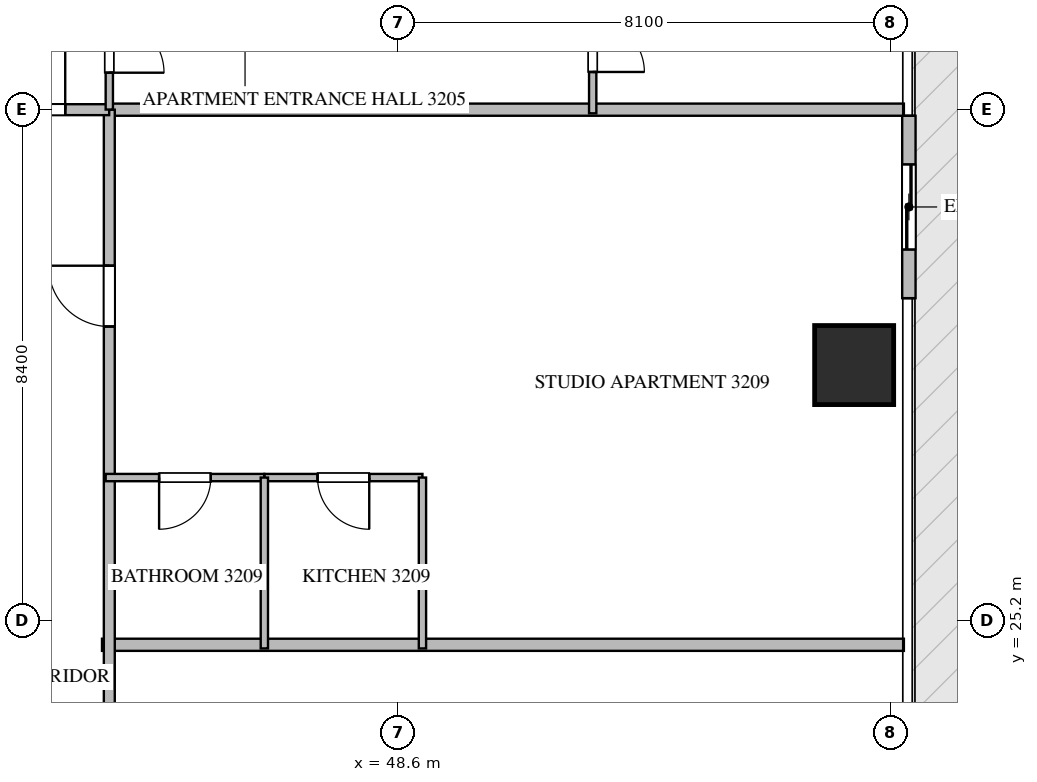
"""IFC4 building model, lengths in metres.
Left out: names, types, materials, properties, quantities, classifications, styles, units other than length and angle.
Written with IfcOpenShell. Run it as: python <this file> out.ifc"""

import sys

from ifc_helpers import new_model, si_unit, direction, frame, frame_2d, origin, origin_2d, place, context, subcontext, project, spatial, rectangle, extrude, source, transform, mapped, element, fill, save


model = new_model("IFC4")
c1 = context("Model", 3, precision=1e-05, world=origin(), true_north=direction((0.0, 1.0)))
c2 = subcontext(c1, "Body", "Model", "MODEL_VIEW")
j1 = project(units=[si_unit("LENGTHUNIT", "METRE"), si_unit("PLANEANGLEUNIT", "RADIAN")], contexts=[c1])
p1 = place(None, origin())
s1 = spatial("IfcSite", under=j1, at=p1, CompositionType="ELEMENT")
p2 = place(p1, origin())
s2 = spatial("IfcBuilding", under=s1, at=p2, CompositionType="ELEMENT")
p3 = place(p2, frame((0.0, 0.0, 131.4)))
s3 = spatial("IfcBuildingStorey", under=s2, at=p3, CompositionType="ELEMENT", Elevation=131.4)
m1 = source(origin(), c2, "Body", "SweptSolid", [
    extrude(rectangle(XDim=1.3, YDim=1.3, at=origin_2d()), origin(), (0.0, 0.0, 1.0), 3.75),
])
p4 = place(p3, frame((56.1, 29.4, -0.26), z_axis=(0.0, 0.0, 1.0), x_axis=(1.0, 0.0, 0.0)))
e1 = element("IfcColumn", 1, at=p4, inside=s3, PredefinedType="COLUMN", context=c2, shape_type="MappedRepresentation", body=[
    mapped(m1, transform((0.0, 0.0, 0.0), scale=1.0)),
])
p5 = place(p3, frame((57.0, 30.5, 0.0), z_axis=(0.0, 0.0, 1.0), x_axis=(0.0, 1.0, 0.0)))
e2 = element("IfcWall", 2, at=p5, inside=s3, PredefinedType="ELEMENTEDWALL", context=c2, shape_type="SweptSolid", body=[
    extrude(rectangle(XDim=3.0, YDim=0.22, at=frame_2d((1.5, 0.0))), origin(), (0.0, 0.0, 1.0), 3.475),
])
p6 = place(p5, frame((0.8, 0.0, 0.0)))
e3 = element("IfcOpeningElement", 3, at=p6, cuts=e2, PredefinedType="OPENING", context=c2, shape_type="SweptSolid", body=[
    extrude(rectangle(XDim=1.4, YDim=2.25, at=frame_2d((0.7, 1.125))), frame((0.0, 0.12, 0.0), z_axis=(0.0, -1.0, 0.0), x_axis=(1.0, 0.0, 0.0)), (0.0, 0.0, 1.0), 0.24),
])
p7 = place(p3, frame((43.73, 24.8, 0.0), z_axis=(0.0, 0.0, 1.0), x_axis=(1.0, 0.0, 0.0)))
e4 = element("IfcWall", 4, at=p7, inside=s3, PredefinedType="PARTITIONING", context=c2, shape_type="SweptSolid", body=[
    extrude(rectangle(XDim=13.188, YDim=0.2, at=frame_2d((6.594, 0.0))), origin(), (0.0, 0.0, 1.0), 3.49),
])
p8 = place(p3, frame((43.85, 33.6, 0.0), z_axis=(0.0, 0.0, 1.0), x_axis=(1.0, 0.0, 0.0)))
e5 = element("IfcWall", 5, at=p8, inside=s3, PredefinedType="PARTITIONING", context=c2, shape_type="SweptSolid", body=[
    extrude(rectangle(XDim=13.068, YDim=0.2, at=frame_2d((6.534, 0.0))), origin(), (0.0, 0.0, 1.0), 3.49),
])
p9 = place(p3, frame((43.85, 14.9, 0.0), z_axis=(0.0, 0.0, 1.0), x_axis=(0.0, 1.0, 0.0)))
e6 = element("IfcWall", 6, at=p9, inside=s3, PredefinedType="PARTITIONING", context=c2, shape_type="SweptSolid", body=[
    extrude(rectangle(XDim=18.7, YDim=0.18, at=frame_2d((9.35, 0.0))), origin(), (0.0, 0.0, 1.0), 3.49),
])
p10 = place(p9, frame((6.708, 0.0, 0.0)))
e7 = element("IfcOpeningElement", 7, at=p10, cuts=e6, PredefinedType="OPENING", context=c2, shape_type="SweptSolid", body=[
    extrude(rectangle(XDim=1.0, YDim=2.15, at=frame_2d((0.5, 1.075))), frame((0.0, 0.1, 0.0), z_axis=(0.0, -1.0, 0.0), x_axis=(1.0, 0.0, 0.0)), (0.0, 0.0, 1.0), 0.2),
])
p11 = place(p9, frame((15.134, 0.0, 0.0)))
e8 = element("IfcOpeningElement", 8, at=p11, cuts=e6, PredefinedType="OPENING", context=c2, shape_type="SweptSolid", body=[
    extrude(rectangle(XDim=1.0, YDim=2.15, at=frame_2d((0.5, 1.075))), frame((0.0, 0.1, 0.0), z_axis=(0.0, -1.0, 0.0), x_axis=(1.0, 0.0, 0.0)), (0.0, 0.0, 1.0), 0.2),
])
p12 = place(p3, frame((41.402, 33.6, 0.0), z_axis=(0.0, 0.0, 1.0), x_axis=(1.0, 0.0, 0.0)))
e9 = element("IfcWall", 9, at=p12, inside=s3, PredefinedType="PARTITIONING", context=c2, shape_type="SweptSolid", body=[
    extrude(rectangle(XDim=2.446, YDim=0.18, at=frame_2d((1.223, 0.0))), origin(), (0.0, 0.0, 1.0), 3.49),
])
p13 = place(p12, frame((0.723, 0.0, 0.0)))
e10 = element("IfcOpeningElement", 10, at=p13, cuts=e9, PredefinedType="OPENING", context=c2, shape_type="SweptSolid", body=[
    extrude(rectangle(XDim=1.0, YDim=2.15, at=frame_2d((0.5, 1.075))), frame((0.0, 0.1, 0.0), z_axis=(0.0, -1.0, 0.0), x_axis=(1.0, 0.0, 0.0)), (0.0, 0.0, 1.0), 0.2),
])
p14 = place(p3, frame((43.85, 35.75, 0.0), z_axis=(0.0, 0.0, 1.0), x_axis=(0.0, -1.0, 0.0)))
e11 = element("IfcWall", 11, at=p14, inside=s3, PredefinedType="PARTITIONING", context=c2, shape_type="SweptSolid", body=[
    extrude(rectangle(XDim=2.148, YDim=0.12, at=frame_2d((1.074, 0.0))), origin(), (0.0, 0.0, 1.0), 3.49),
])
p15 = place(p14, frame((0.642, 0.0, 0.0)))
e12 = element("IfcOpeningElement", 12, at=p15, cuts=e11, PredefinedType="OPENING", context=c2, shape_type="SweptSolid", body=[
    extrude(rectangle(XDim=0.9, YDim=2.1, at=frame_2d((0.45, 1.05))), frame((0.0, 0.07, 0.0), z_axis=(0.0, -1.0, 0.0), x_axis=(1.0, 0.0, 0.0)), (0.0, 0.0, 1.0), 0.14),
])
p16 = place(p3, frame((51.8, 35.75, 0.0), z_axis=(0.0, 0.0, 1.0), x_axis=(0.0, -1.0, 0.0)))
e13 = element("IfcWall", 13, at=p16, inside=s3, PredefinedType="PARTITIONING", context=c2, shape_type="SweptSolid", body=[
    extrude(rectangle(XDim=2.21, YDim=0.12, at=frame_2d((1.105, 0.0))), origin(), (0.0, 0.0, 1.0), 3.49),
])
p17 = place(p16, frame((0.68, 0.0, 0.0)))
e14 = element("IfcOpeningElement", 14, at=p17, cuts=e13, PredefinedType="OPENING", context=c2, shape_type="SweptSolid", body=[
    extrude(rectangle(XDim=0.85, YDim=2.1, at=frame_2d((0.425, 1.05))), frame((0.0, 0.07, 0.0), z_axis=(0.0, -1.0, 0.0), x_axis=(1.0, 0.0, 0.0)), (0.0, 0.0, 1.0), 0.14),
])
p18 = place(p3, frame((49.0, 27.55, 0.0), z_axis=(0.0, 0.0, 1.0), x_axis=(-1.0, 0.0, 0.0)))
e15 = element("IfcWall", 15, at=p18, inside=s3, PredefinedType="PARTITIONING", context=c2, shape_type="SweptSolid", body=[
    extrude(rectangle(XDim=2.6, YDim=0.12, at=frame_2d((1.3, 0.0))), origin(), (0.0, 0.0, 1.0), 3.49),
])
p19 = place(p18, frame((0.875, 0.0, 0.0)))
e16 = element("IfcOpeningElement", 16, at=p19, cuts=e15, PredefinedType="OPENING", context=c2, shape_type="SweptSolid", body=[
    extrude(rectangle(XDim=0.85, YDim=2.1, at=frame_2d((0.425, 1.05))), frame((0.0, 0.07, 0.0), z_axis=(0.0, -1.0, 0.0), x_axis=(1.0, 0.0, 0.0)), (0.0, 0.0, 1.0), 0.14),
])
p20 = place(p3, frame((46.398, 27.55, 0.0), z_axis=(0.0, 0.0, 1.0), x_axis=(-1.0, 0.0, 0.0)))
e17 = element("IfcWall", 17, at=p20, inside=s3, PredefinedType="PARTITIONING", context=c2, shape_type="SweptSolid", body=[
    extrude(rectangle(XDim=2.608, YDim=0.12, at=frame_2d((1.304, 0.0))), origin(), (0.0, 0.0, 1.0), 3.49),
])
p21 = place(p20, frame((0.879, 0.0, 0.0)))
e18 = element("IfcOpeningElement", 18, at=p21, cuts=e17, PredefinedType="OPENING", context=c2, shape_type="SweptSolid", body=[
    extrude(rectangle(XDim=0.85, YDim=2.1, at=frame_2d((0.425, 1.05))), frame((0.0, 0.07, 0.0), z_axis=(0.0, -1.0, 0.0), x_axis=(1.0, 0.0, 0.0)), (0.0, 0.0, 1.0), 0.14),
])
for number, where, z_axis, x_axis in (
    (19, (46.4, 24.74, 0.0), (0.0, 0.0, 1.0), (0.0, 1.0, 0.0)),
    (20, (49.0, 24.74, 0.0), (0.0, 0.0, 1.0), (0.0, 1.0, 0.0)),
):
    element("IfcWall", number, at=place(p3, frame(where, z_axis=z_axis, x_axis=x_axis)), inside=s3, PredefinedType="PARTITIONING", context=c2, shape_type="SweptSolid", body=[
        extrude(rectangle(XDim=2.81, YDim=0.12, at=frame_2d((1.405, 0.0))), origin(), (0.0, 0.0, 1.0), 3.49),
    ])
m2 = source(origin(), c2, "Body", "SweptSolid", [
    extrude(rectangle(XDim=1.4, YDim=2.25, at=frame_2d((0.7, 1.125))), frame((0.0, 0.025, 0.0), z_axis=(0.0, -1.0, 0.0), x_axis=(1.0, 0.0, 0.0)), (0.0, 0.0, 1.0), 0.05),
])
p22 = place(p6, origin())
e21 = element("IfcDoor", 21, at=p22, inside=s3, OperationType="SLIDING_TO_LEFT", PredefinedType="DOOR", context=c2, shape_type="MappedRepresentation", body=[
    mapped(m2, transform((0.0, 0.0, 0.0), scale=1.0)),
])
fill(e3, e21)
m3 = source(origin(), c2, "Body", "SweptSolid", [
    extrude(rectangle(XDim=1.0, YDim=2.15, at=frame_2d((0.5, 1.075))), frame((0.0, 0.025, 0.0), z_axis=(0.0, -1.0, 0.0), x_axis=(1.0, 0.0, 0.0)), (0.0, 0.0, 1.0), 0.05),
])
p23 = place(p11, origin())
e22 = element("IfcDoor", 22, at=p23, inside=s3, OperationType="SINGLE_SWING_RIGHT", PredefinedType="DOOR", context=c2, shape_type="MappedRepresentation", body=[
    mapped(m3, transform((0.0, 0.0, 0.0), scale=1.0)),
])
fill(e8, e22)
p24 = place(p13, origin())
e23 = element("IfcDoor", 23, at=p24, inside=s3, OperationType="SINGLE_SWING_RIGHT", PredefinedType="DOOR", context=c2, shape_type="MappedRepresentation", body=[
    mapped(m3, transform((0.0, 0.0, 0.0), scale=1.0)),
])
fill(e10, e23)
m4 = source(origin(), c2, "Body", "SweptSolid", [
    extrude(rectangle(XDim=0.9, YDim=2.1, at=frame_2d((0.45, 1.05))), frame((0.0, 0.025, 0.0), z_axis=(0.0, -1.0, 0.0), x_axis=(1.0, 0.0, 0.0)), (0.0, 0.0, 1.0), 0.05),
])
p25 = place(p15, origin())
e24 = element("IfcDoor", 24, at=p25, inside=s3, OperationType="SINGLE_SWING_RIGHT", PredefinedType="DOOR", context=c2, shape_type="MappedRepresentation", body=[
    mapped(m4, transform((0.0, 0.0, 0.0), scale=1.0)),
])
fill(e12, e24)
m5 = source(origin(), c2, "Body", "SweptSolid", [
    extrude(rectangle(XDim=0.85, YDim=2.1, at=frame_2d((0.425, 1.05))), frame((0.0, 0.025, 0.0), z_axis=(0.0, -1.0, 0.0), x_axis=(1.0, 0.0, 0.0)), (0.0, 0.0, 1.0), 0.05),
])
p26 = place(p17, origin())
e25 = element("IfcDoor", 25, at=p26, inside=s3, OperationType="SINGLE_SWING_RIGHT", PredefinedType="DOOR", context=c2, shape_type="MappedRepresentation", body=[
    mapped(m5, transform((0.0, 0.0, 0.0), scale=1.0)),
])
fill(e14, e25)
p27 = place(p19, origin())
e26 = element("IfcDoor", 26, at=p27, inside=s3, OperationType="SINGLE_SWING_LEFT", PredefinedType="DOOR", context=c2, shape_type="MappedRepresentation", body=[
    mapped(m5, transform((0.0, 0.0, 0.0), scale=1.0)),
])
fill(e16, e26)
p28 = place(p21, origin())
e27 = element("IfcDoor", 27, at=p28, inside=s3, OperationType="SINGLE_SWING_RIGHT", PredefinedType="DOOR", context=c2, shape_type="MappedRepresentation", body=[
    mapped(m5, transform((0.0, 0.0, 0.0), scale=1.0)),
])
fill(e18, e27)
save(model, sys.argv[1])
